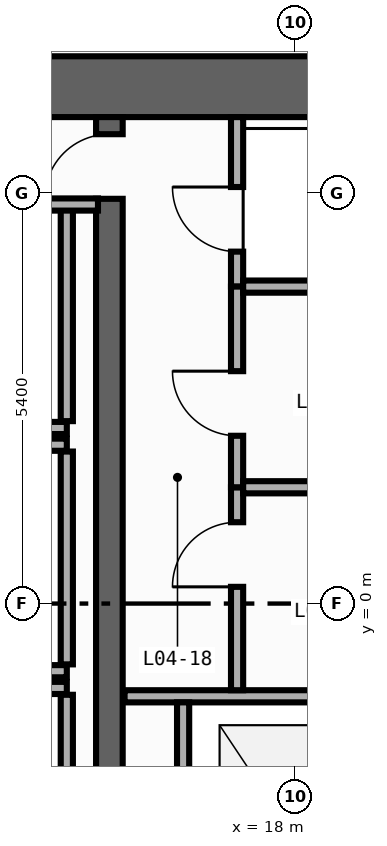
"""IFC4 building model, lengths in metres.
Left out: names, types, materials, properties, quantities, classifications, styles, units other than length and angle.
Written with IfcOpenShell. Run it as: python <this file> out.ifc"""

import sys

from ifc_helpers import new_model, si_unit, direction, frame, frame_2d, origin, place, context, subcontext, project, spatial, rectangle, extrude, element, fill, save


model = new_model("IFC4")
c1 = context("Model", 3, precision=1e-05, world=origin(), true_north=direction((0.0, 1.0)))
c2 = subcontext(c1, "Body", "Model", "MODEL_VIEW")
j1 = project(units=[si_unit("LENGTHUNIT", "METRE"), si_unit("PLANEANGLEUNIT", "RADIAN")], contexts=[c1])
p1 = place(None, origin())
s1 = spatial("IfcSite", under=j1, at=p1, CompositionType="ELEMENT")
p2 = place(p1, origin())
s2 = spatial("IfcBuilding", under=s1, at=p2, CompositionType="ELEMENT")
p3 = place(p2, frame((0.0, 0.0, 16.0)))
s3 = spatial("IfcBuildingStorey", under=s2, at=p3, CompositionType="ELEMENT", Elevation=16.0)
p4 = place(p3, frame((12.8, 6.8, 0.0), z_axis=(0.0, 0.0, 1.0), x_axis=(1.0, 0.0, 0.0)))
e1 = element("IfcWall", 1, at=p4, inside=s3, PredefinedType="SHEAR", context=c2, shape_type="SweptSolid", body=[
    extrude(rectangle(XDim=6.8, YDim=0.8, at=frame_2d((3.4, 0.0))), origin(), (0.0, 0.0, 1.0), 4.55),
])
p5 = place(p3, frame((15.55, -19.0, 0.0), z_axis=(0.0, 0.0, 1.0), x_axis=(0.0, 1.0, 0.0)))
e2 = element("IfcWall", 2, at=p5, inside=s3, PredefinedType="SHEAR", context=c2, shape_type="SweptSolid", body=[
    extrude(rectangle(XDim=25.4, YDim=0.35, at=frame_2d((12.7, 0.0))), origin(), (0.0, 0.0, 1.0), 4.55),
])
p6 = place(p5, frame((11.925, 0.0, 0.0)))
e3 = element("IfcOpeningElement", 3, at=p6, cuts=e2, PredefinedType="OPENING", context=c2, shape_type="SweptSolid", body=[
    extrude(rectangle(XDim=1.15, YDim=2.2, at=frame_2d((0.575, 1.1))), frame((0.0, 0.185, 0.0), z_axis=(0.0, -1.0, 0.0), x_axis=(1.0, 0.0, 0.0)), (0.0, 0.0, 1.0), 0.37),
])
p7 = place(p5, frame((24.325, 0.0, 0.0)))
e4 = element("IfcOpeningElement", 4, at=p7, cuts=e2, PredefinedType="OPENING", context=c2, shape_type="SweptSolid", body=[
    extrude(rectangle(XDim=0.85, YDim=2.1, at=frame_2d((0.425, 1.05))), frame((0.0, 0.185, 0.0), z_axis=(0.0, -1.0, 0.0), x_axis=(1.0, 0.0, 0.0)), (0.0, 0.0, 1.0), 0.37),
])
p8 = place(p3, frame((12.8, 2.31, 0.0), z_axis=(0.0, 0.0, 1.0), x_axis=(1.0, 0.0, 0.0)))
e5 = element("IfcWall", 5, at=p8, inside=s3, PredefinedType="STANDARD", context=c2, shape_type="SweptSolid", body=[
    extrude(rectangle(XDim=2.19, YDim=0.16, at=frame_2d((1.095, 0.0))), origin(), (0.0, 0.0, 1.0), 4.55),
])
p9 = place(p3, frame((14.99, 2.4, 0.0), z_axis=(0.0, 0.0, 1.0), x_axis=(0.0, 1.0, 0.0)))
e6 = element("IfcWall", 6, at=p9, inside=s3, PredefinedType="STANDARD", context=c2, shape_type="SweptSolid", body=[
    extrude(rectangle(XDim=2.8, YDim=0.16, at=frame_2d((1.4, 0.0))), origin(), (0.0, 0.0, 1.0), 4.55),
])
for number, where, z_axis, x_axis in (
    (7, (12.8, -0.89, 0.0), (0.0, 0.0, 1.0), (1.0, 0.0, 0.0)),
    (8, (12.8, 2.09, 0.0), (0.0, 0.0, 1.0), (1.0, 0.0, 0.0)),
):
    element("IfcWall", number, at=place(p3, frame(where, z_axis=z_axis, x_axis=x_axis)), inside=s3, PredefinedType="STANDARD", context=c2, shape_type="SweptSolid", body=[
        extrude(rectangle(XDim=2.19, YDim=0.16, at=frame_2d((1.095, 0.0))), origin(), (0.0, 0.0, 1.0), 4.55),
    ])
p10 = place(p3, frame((14.99, -0.8, 0.0), z_axis=(0.0, 0.0, 1.0), x_axis=(0.0, 1.0, 0.0)))
e9 = element("IfcWall", 9, at=p10, inside=s3, PredefinedType="STANDARD", context=c2, shape_type="SweptSolid", body=[
    extrude(rectangle(XDim=2.8, YDim=0.16, at=frame_2d((1.4, 0.0))), origin(), (0.0, 0.0, 1.0), 4.55),
])
p11 = place(p3, frame((12.8, -1.11, 0.0), z_axis=(0.0, 0.0, 1.0), x_axis=(1.0, 0.0, 0.0)))
e10 = element("IfcWall", 10, at=p11, inside=s3, PredefinedType="STANDARD", context=c2, shape_type="SweptSolid", body=[
    extrude(rectangle(XDim=2.19, YDim=0.16, at=frame_2d((1.095, 0.0))), origin(), (0.0, 0.0, 1.0), 4.55),
])
p12 = place(p3, frame((14.99, -4.0, 0.0), z_axis=(0.0, 0.0, 1.0), x_axis=(0.0, 1.0, 0.0)))
e11 = element("IfcWall", 11, at=p12, inside=s3, PredefinedType="STANDARD", context=c2, shape_type="SweptSolid", body=[
    extrude(rectangle(XDim=2.8, YDim=0.16, at=frame_2d((1.4, 0.0))), origin(), (0.0, 0.0, 1.0), 4.55),
])
p13 = place(p3, frame((15.75, -1.22, 0.0), z_axis=(0.0, 0.0, 1.0), x_axis=(1.0, 0.0, 0.0)))
e12 = element("IfcWall", 12, at=p13, inside=s3, PredefinedType="STANDARD", context=c2, shape_type="SweptSolid", body=[
    extrude(rectangle(XDim=3.8, YDim=0.16, at=frame_2d((1.9, 0.0))), origin(), (0.0, 0.0, 1.0), 4.55),
])
p14 = place(p3, frame((16.52, -4.28, 0.0), z_axis=(0.0, 0.0, 1.0), x_axis=(0.0, 1.0, 0.0)))
e13 = element("IfcWall", 13, at=p14, inside=s3, PredefinedType="STANDARD", context=c2, shape_type="SweptSolid", body=[
    extrude(rectangle(XDim=2.98, YDim=0.16, at=frame_2d((1.49, 0.0))), origin(), (0.0, 0.0, 1.0), 4.55),
])
p15 = place(p3, frame((12.8, 5.25, 0.0), z_axis=(0.0, 0.0, 1.0), x_axis=(1.0, 0.0, 0.0)))
e14 = element("IfcWall", 14, at=p15, inside=s3, PredefinedType="STANDARD", context=c2, shape_type="SweptSolid", body=[
    extrude(rectangle(XDim=2.6, YDim=0.16, at=frame_2d((1.3, 0.0))), origin(), (0.0, 0.0, 1.0), 4.55),
])
p16 = place(p3, frame((17.23, 4.17, 0.0), z_axis=(0.0, 0.0, 1.0), x_axis=(0.0, 1.0, 0.0)))
e15 = element("IfcWall", 15, at=p16, inside=s3, PredefinedType="PARTITIONING", context=c2, shape_type="SweptSolid", body=[
    extrude(rectangle(XDim=2.23, YDim=0.16, at=frame_2d((1.115, 0.0))), origin(), (0.0, 0.0, 1.0), 4.55),
])
p17 = place(p16, frame((0.46, 0.0, 0.0)))
e16 = element("IfcOpeningElement", 16, at=p17, cuts=e15, PredefinedType="OPENING", context=c2, shape_type="SweptSolid", body=[
    extrude(rectangle(XDim=0.85, YDim=2.1, at=frame_2d((0.425, 1.05))), frame((0.0, 0.09, 0.0), z_axis=(0.0, -1.0, 0.0), x_axis=(1.0, 0.0, 0.0)), (0.0, 0.0, 1.0), 0.18),
])
p18 = place(p3, frame((17.23, -1.14, 0.0), z_axis=(0.0, 0.0, 1.0), x_axis=(0.0, 1.0, 0.0)))
e17 = element("IfcWall", 17, at=p18, inside=s3, PredefinedType="PARTITIONING", context=c2, shape_type="SweptSolid", body=[
    extrude(rectangle(XDim=2.67, YDim=0.16, at=frame_2d((1.335, 0.0))), origin(), (0.0, 0.0, 1.0), 4.55),
])
p19 = place(p18, frame((1.36, 0.0, 0.0)))
e18 = element("IfcOpeningElement", 18, at=p19, cuts=e17, PredefinedType="OPENING", context=c2, shape_type="SweptSolid", body=[
    extrude(rectangle(XDim=0.85, YDim=2.1, at=frame_2d((0.425, 1.05))), frame((0.0, 0.09, 0.0), z_axis=(0.0, -1.0, 0.0), x_axis=(1.0, 0.0, 0.0)), (0.0, 0.0, 1.0), 0.18),
])
p20 = place(p3, frame((17.23, 1.53, 0.0), z_axis=(0.0, 0.0, 1.0), x_axis=(0.0, 1.0, 0.0)))
e19 = element("IfcWall", 19, at=p20, inside=s3, PredefinedType="PARTITIONING", context=c2, shape_type="SweptSolid", body=[
    extrude(rectangle(XDim=2.64, YDim=0.16, at=frame_2d((1.32, 0.0))), origin(), (0.0, 0.0, 1.0), 4.55),
])
p21 = place(p20, frame((0.677, 0.0, 0.0)))
e20 = element("IfcOpeningElement", 20, at=p21, cuts=e19, PredefinedType="OPENING", context=c2, shape_type="SweptSolid", body=[
    extrude(rectangle(XDim=0.85, YDim=2.1, at=frame_2d((0.425, 1.05))), frame((0.0, 0.09, 0.0), z_axis=(0.0, -1.0, 0.0), x_axis=(1.0, 0.0, 0.0)), (0.0, 0.0, 1.0), 0.18),
])
for number, where, z_axis, x_axis in (
    (21, (17.31, 4.17, 0.0), (0.0, 0.0, 1.0), (1.0, 0.0, 0.0)),
    (22, (17.31, 1.53, 0.0), (0.0, 0.0, 1.0), (1.0, 0.0, 0.0)),
):
    element("IfcWall", number, at=place(p3, frame(where, z_axis=z_axis, x_axis=x_axis)), inside=s3, PredefinedType="PARTITIONING", context=c2, shape_type="SweptSolid", body=[
        extrude(rectangle(XDim=2.29, YDim=0.16, at=frame_2d((1.145, 0.0))), origin(), (0.0, 0.0, 1.0), 4.55),
    ])
p22 = place(p7, origin())
e23 = element("IfcDoor", 23, at=p22, inside=s3, OperationType="SINGLE_SWING_LEFT", PredefinedType="DOOR", context=c2, shape_type="SweptSolid", body=[
    extrude(rectangle(XDim=0.85, YDim=2.1, at=frame_2d((0.425, 1.05))), frame((0.0, 0.025, 0.0), z_axis=(0.0, -1.0, 0.0), x_axis=(1.0, 0.0, 0.0)), (0.0, 0.0, 1.0), 0.05),
])
fill(e4, e23)
p23 = place(p17, origin())
e24 = element("IfcDoor", 24, at=p23, inside=s3, OperationType="SINGLE_SWING_RIGHT", PredefinedType="DOOR", context=c2, shape_type="SweptSolid", body=[
    extrude(rectangle(XDim=0.85, YDim=2.1, at=frame_2d((0.425, 1.05))), frame((0.0, 0.025, 0.0), z_axis=(0.0, -1.0, 0.0), x_axis=(1.0, 0.0, 0.0)), (0.0, 0.0, 1.0), 0.05),
])
fill(e16, e24)
p24 = place(p19, origin())
e25 = element("IfcDoor", 25, at=p24, inside=s3, OperationType="SINGLE_SWING_LEFT", PredefinedType="DOOR", context=c2, shape_type="SweptSolid", body=[
    extrude(rectangle(XDim=0.85, YDim=2.1, at=frame_2d((0.425, 1.05))), frame((0.0, 0.025, 0.0), z_axis=(0.0, -1.0, 0.0), x_axis=(1.0, 0.0, 0.0)), (0.0, 0.0, 1.0), 0.05),
])
fill(e18, e25)
p25 = place(p21, origin())
e26 = element("IfcDoor", 26, at=p25, inside=s3, OperationType="SINGLE_SWING_RIGHT", PredefinedType="DOOR", context=c2, shape_type="SweptSolid", body=[
    extrude(rectangle(XDim=0.85, YDim=2.1, at=frame_2d((0.425, 1.05))), frame((0.0, 0.025, 0.0), z_axis=(0.0, -1.0, 0.0), x_axis=(1.0, 0.0, 0.0)), (0.0, 0.0, 1.0), 0.05),
])
fill(e20, e26)
save(model, sys.argv[1])
